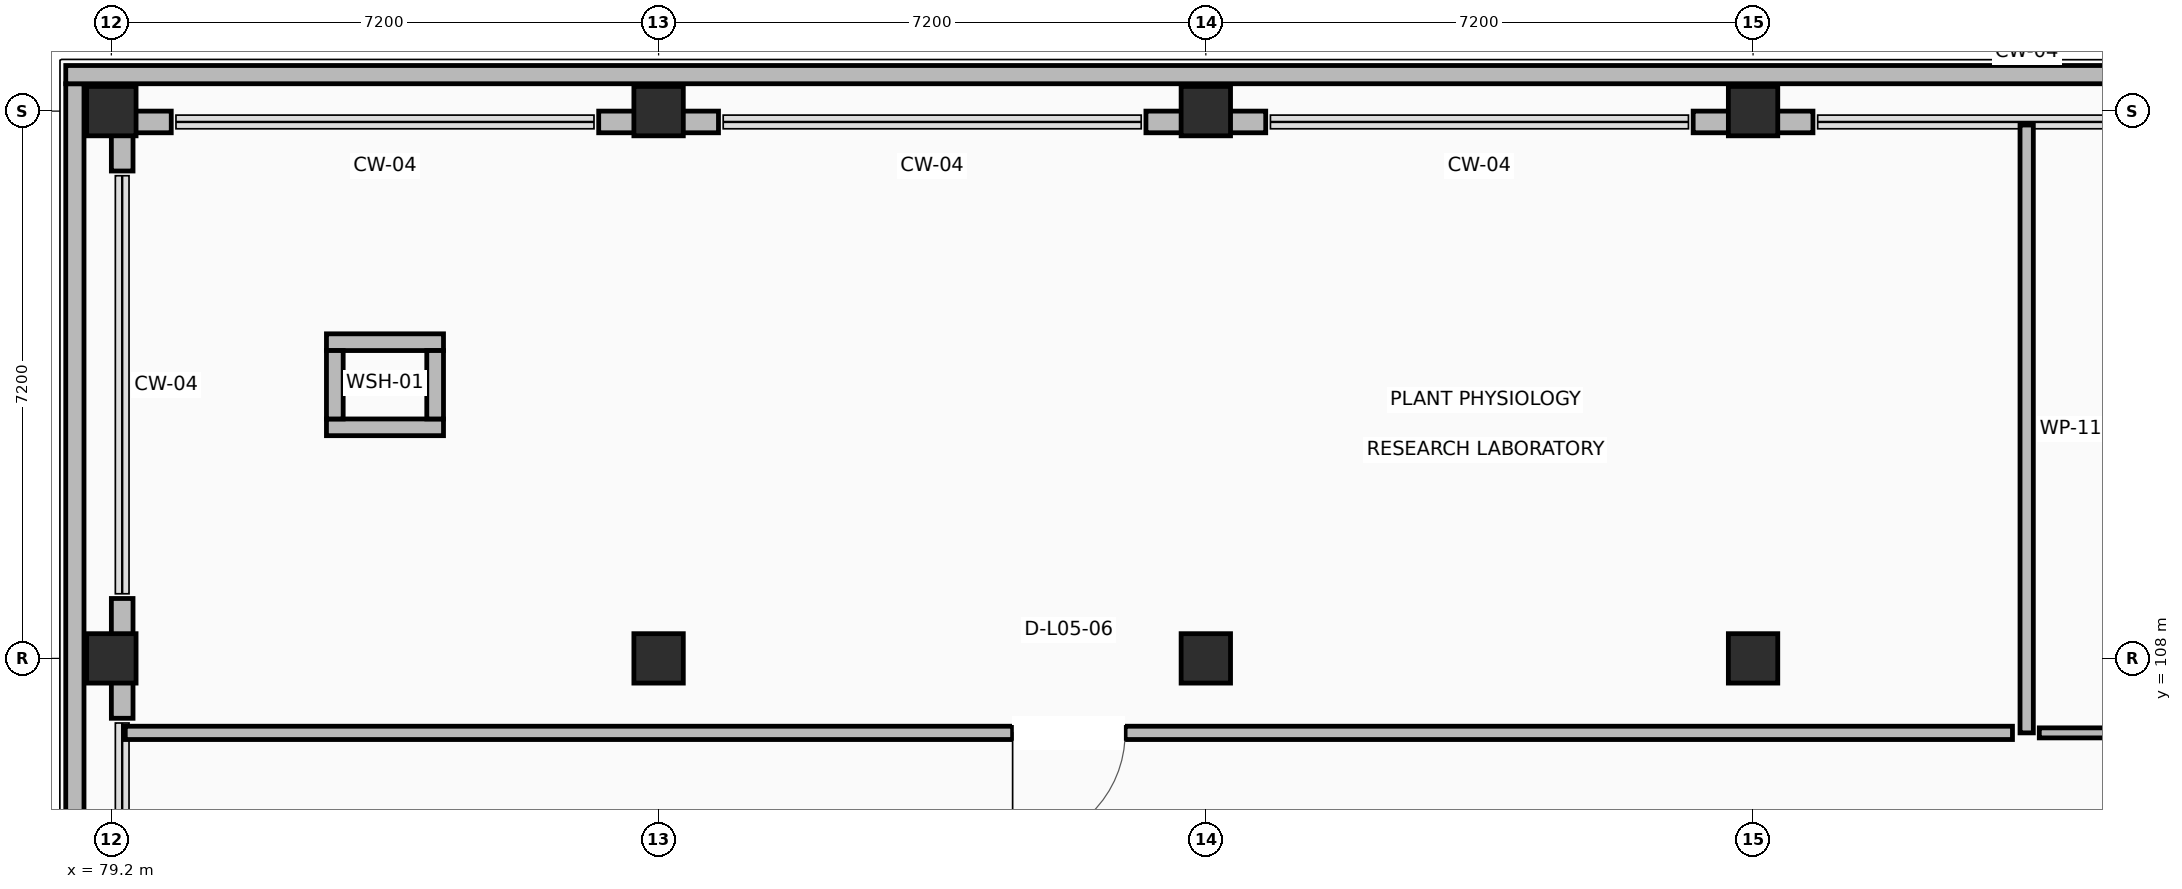
"""IFC4 building model, lengths in metres.
Left out: names, types, materials, properties, quantities, classifications, styles, units other than length and angle.
Written with IfcOpenShell. Run it as: python <this file> out.ifc"""

import sys

from ifc_helpers import new_model, si_unit, direction, frame, frame_2d, origin, origin_2d, place, context, subcontext, project, spatial, rectangle, extrude, element, fill, save


model = new_model("IFC4")
c1 = context("Model", 3, precision=1e-05, world=origin(), true_north=direction((0.0, 1.0)))
c2 = subcontext(c1, "Body", "Model", "MODEL_VIEW")
j1 = project(units=[si_unit("LENGTHUNIT", "METRE"), si_unit("PLANEANGLEUNIT", "RADIAN")], contexts=[c1])
p1 = place(None, origin())
s1 = spatial("IfcSite", under=j1, at=p1, CompositionType="ELEMENT")
p2 = place(p1, origin())
s2 = spatial("IfcBuilding", under=s1, at=p2, CompositionType="ELEMENT")
p3 = place(p2, frame((0.0, 0.0, 22.5)))
s3 = spatial("IfcBuildingStorey", under=s2, at=p3, CompositionType="ELEMENT", Elevation=22.5)
for number, where, z_axis, x_axis in (
    (1, (79.2, 108.0, 0.0), (0.0, 0.0, 1.0), (1.0, 0.0, 0.0)),
    (2, (79.2, 115.2, 0.0), (0.0, 0.0, 1.0), (1.0, 0.0, 0.0)),
    (3, (86.4, 108.0, 0.0), (0.0, 0.0, 1.0), (1.0, 0.0, 0.0)),
    (4, (86.4, 115.2, 0.0), (0.0, 0.0, 1.0), (1.0, 0.0, 0.0)),
    (5, (93.6, 108.0, 0.0), (0.0, 0.0, 1.0), (1.0, 0.0, 0.0)),
    (6, (93.6, 115.2, 0.0), (0.0, 0.0, 1.0), (1.0, 0.0, 0.0)),
    (7, (100.8, 108.0, 0.0), (0.0, 0.0, 1.0), (1.0, 0.0, 0.0)),
    (8, (100.8, 115.2, 0.0), (0.0, 0.0, 1.0), (1.0, 0.0, 0.0)),
):
    element("IfcColumn", number, at=place(p3, frame(where, z_axis=z_axis, x_axis=x_axis)), inside=s3, PredefinedType="COLUMN", context=c2, shape_type="SweptSolid", body=[
        extrude(rectangle(XDim=0.65, YDim=0.65, at=origin_2d()), origin(), (0.0, 0.0, 1.0), 4.22),
    ])
for number, where, z_axis, x_axis in (
    (9, (101.588, 115.058, 0.0), (0.0, 0.0, 1.0), (-1.0, 0.0, 0.0)),
    (10, (94.388, 115.058, 0.0), (0.0, 0.0, 1.0), (-1.0, 0.0, 0.0)),
    (11, (87.188, 115.058, 0.0), (0.0, 0.0, 1.0), (-1.0, 0.0, 0.0)),
):
    element("IfcWall", number, at=place(p3, frame(where, z_axis=z_axis, x_axis=x_axis)), inside=s3, PredefinedType="STANDARD", context=c2, shape_type="SweptSolid", body=[
        extrude(rectangle(XDim=1.576, YDim=0.285, at=frame_2d((0.788, 0.0))), origin(), (0.0, 0.0, 1.0), 3.26),
    ])
p4 = place(p3, frame((79.988, 115.058, 0.0), z_axis=(0.0, 0.0, 1.0), x_axis=(-1.0, 0.0, 0.0)))
e12 = element("IfcWall", 12, at=p4, inside=s3, PredefinedType="STANDARD", context=c2, shape_type="SweptSolid", body=[
    extrude(rectangle(XDim=0.788, YDim=0.285, at=frame_2d((0.394, 0.0))), origin(), (0.0, 0.0, 1.0), 3.26),
])
p5 = place(p3, frame((79.343, 114.915, 0.0), z_axis=(0.0, 0.0, 1.0), x_axis=(0.0, -1.0, 0.0)))
e13 = element("IfcWall", 13, at=p5, inside=s3, PredefinedType="STANDARD", context=c2, shape_type="SweptSolid", body=[
    extrude(rectangle(XDim=0.503, YDim=0.285, at=frame_2d((0.251, 0.0))), origin(), (0.0, 0.0, 1.0), 3.26),
])
p6 = place(p3, frame((79.343, 108.788, 0.0), z_axis=(0.0, 0.0, 1.0), x_axis=(0.0, -1.0, 0.0)))
e14 = element("IfcWall", 14, at=p6, inside=s3, PredefinedType="STANDARD", context=c2, shape_type="SweptSolid", body=[
    extrude(rectangle(XDim=1.576, YDim=0.285, at=frame_2d((0.788, 0.0))), origin(), (0.0, 0.0, 1.0), 3.26),
])
p7 = place(p3, frame((78.72, 93.24, 0.0), z_axis=(0.0, 0.0, 1.0), x_axis=(0.0, 1.0, 0.0)))
e15 = element("IfcWall", 15, at=p7, inside=s3, PredefinedType="PARAPET", context=c2, shape_type="SweptSolid", body=[
    extrude(rectangle(XDim=22.32, YDim=0.24, at=frame_2d((11.16, 0.0))), origin(), (0.0, 0.0, 1.0), 1.12),
])
p8 = place(p3, frame((78.6, 115.68, 0.0), z_axis=(0.0, 0.0, 1.0), x_axis=(1.0, 0.0, 0.0)))
e16 = element("IfcWall", 16, at=p8, inside=s3, PredefinedType="PARAPET", context=c2, shape_type="SweptSolid", body=[
    extrude(rectangle(XDim=73.2, YDim=0.24, at=frame_2d((36.6, 0.0))), origin(), (0.0, 0.0, 1.0), 1.12),
])
for number, where, z_axis, x_axis in (
    (17, (82.03, 111.04, 0.0), (0.0, 0.0, 1.0), (1.0, 0.0, 0.0)),
    (18, (82.03, 112.16, 0.0), (0.0, 0.0, 1.0), (1.0, 0.0, 0.0)),
):
    element("IfcWall", number, at=place(p3, frame(where, z_axis=z_axis, x_axis=x_axis)), inside=s3, PredefinedType="STANDARD", context=c2, shape_type="SweptSolid", body=[
        extrude(rectangle(XDim=1.54, YDim=0.22, at=frame_2d((0.77, 0.0))), origin(), (0.0, 0.0, 1.0), 3.26),
    ])
for number, where, z_axis, x_axis in (
    (19, (82.14, 111.15, 0.0), (0.0, 0.0, 1.0), (0.0, 1.0, 0.0)),
    (20, (83.46, 111.15, 0.0), (0.0, 0.0, 1.0), (0.0, 1.0, 0.0)),
):
    element("IfcWall", number, at=place(p3, frame(where, z_axis=z_axis, x_axis=x_axis)), inside=s3, PredefinedType="STANDARD", context=c2, shape_type="SweptSolid", body=[
        extrude(rectangle(XDim=0.9, YDim=0.22, at=frame_2d((0.45, 0.0))), origin(), (0.0, 0.0, 1.0), 3.26),
    ])
p9 = place(p3, frame((104.4, 115.017, 0.0), z_axis=(0.0, 0.0, 1.0), x_axis=(0.0, -1.0, 0.0)))
e21 = element("IfcWall", 21, at=p9, inside=s3, PredefinedType="PARTITIONING", context=c2, shape_type="SweptSolid", body=[
    extrude(rectangle(XDim=7.997, YDim=0.175, at=frame_2d((3.999, 0.0))), origin(), (0.0, 0.0, 1.0), 3.26),
])
p10 = place(p3, frame((104.213, 107.02, 0.0), z_axis=(0.0, 0.0, 1.0), x_axis=(-1.0, 0.0, 0.0)))
e22 = element("IfcWall", 22, at=p10, inside=s3, PredefinedType="PARTITIONING", context=c2, shape_type="SweptSolid", body=[
    extrude(rectangle(XDim=24.83, YDim=0.175, at=frame_2d((12.415, 0.0))), origin(), (0.0, 0.0, 1.0), 3.26),
])
p11 = place(p10, frame((11.675, 0.0, 0.0)))
e23 = element("IfcOpeningElement", 23, at=p11, cuts=e22, PredefinedType="OPENING", context=c2, shape_type="SweptSolid", body=[
    extrude(rectangle(XDim=1.48, YDim=2.2, at=frame_2d((0.74, 1.1))), frame((0.0, 0.097, 0.0), z_axis=(0.0, -1.0, 0.0), x_axis=(1.0, 0.0, 0.0)), (0.0, 0.0, 1.0), 0.195),
])
p12 = place(p3, frame((125.856, 107.02, 0.0), z_axis=(0.0, 0.0, 1.0), x_axis=(-1.0, 0.0, 0.0)))
e24 = element("IfcWall", 24, at=p12, inside=s3, PredefinedType="PARTITIONING", context=c2, shape_type="SweptSolid", body=[
    extrude(rectangle(XDim=21.29, YDim=0.132, at=frame_2d((10.645, 0.0))), origin(), (0.0, 0.0, 1.0), 3.26),
])
p13 = place(p12, frame((9.105, 0.0, 0.0)))
e25 = element("IfcOpeningElement", 25, at=p13, cuts=e24, PredefinedType="OPENING", context=c2, shape_type="SweptSolid", body=[
    extrude(rectangle(XDim=0.98, YDim=2.1, at=frame_2d((0.49, 1.05))), frame((0.0, 0.076, 0.0), z_axis=(0.0, -1.0, 0.0), x_axis=(1.0, 0.0, 0.0)), (0.0, 0.0, 1.0), 0.152),
])
p14 = place(p11, origin())
e26 = element("IfcDoor", 26, at=p14, inside=s3, OperationType="SINGLE_SWING_RIGHT", PredefinedType="DOOR", context=c2, shape_type="SweptSolid", body=[
    extrude(rectangle(XDim=1.48, YDim=2.2, at=frame_2d((0.74, 1.1))), frame((0.0, 0.025, 0.0), z_axis=(0.0, -1.0, 0.0), x_axis=(1.0, 0.0, 0.0)), (0.0, 0.0, 1.0), 0.05),
])
fill(e23, e26)
save(model, sys.argv[1])
